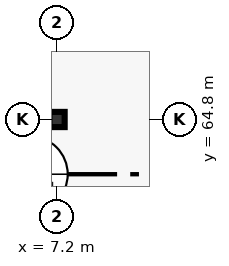
"""IFC4 building model, lengths in metres.
Left out: names, types, materials, properties, quantities, classifications, styles, units other than length and angle.
Written with IfcOpenShell. Run it as: python <this file> out.ifc"""

import sys

from ifc_helpers import new_model, si_unit, direction, frame, origin, origin_2d, place, context, subcontext, project, spatial, rectangle, extrude, element, save


model = new_model("IFC4")
c1 = context("Model", 3, precision=1e-05, world=origin(), true_north=direction((0.0, 1.0)))
c2 = subcontext(c1, "Body", "Model", "MODEL_VIEW")
j1 = project(units=[si_unit("LENGTHUNIT", "METRE"), si_unit("PLANEANGLEUNIT", "RADIAN")], contexts=[c1])
p1 = place(None, origin())
s1 = spatial("IfcSite", under=j1, at=p1, CompositionType="ELEMENT")
p2 = place(p1, origin())
s2 = spatial("IfcBuilding", under=s1, at=p2, CompositionType="ELEMENT")
p3 = place(p2, frame((0.0, 0.0, -5.4)))
s3 = spatial("IfcBuildingStorey", under=s2, at=p3, CompositionType="ELEMENT", Elevation=-5.4)
p4 = place(p3, frame((7.2, 64.8, 0.0), z_axis=(0.0, 0.0, 1.0), x_axis=(1.0, 0.0, 0.0)))
e1 = element("IfcColumn", 1, at=p4, inside=s3, PredefinedType="COLUMN", context=c2, shape_type="SweptSolid", body=[
    extrude(rectangle(XDim=1.0, YDim=1.0, at=origin_2d()), origin(), (0.0, 0.0, 1.0), 5.4),
])
save(model, sys.argv[1])
